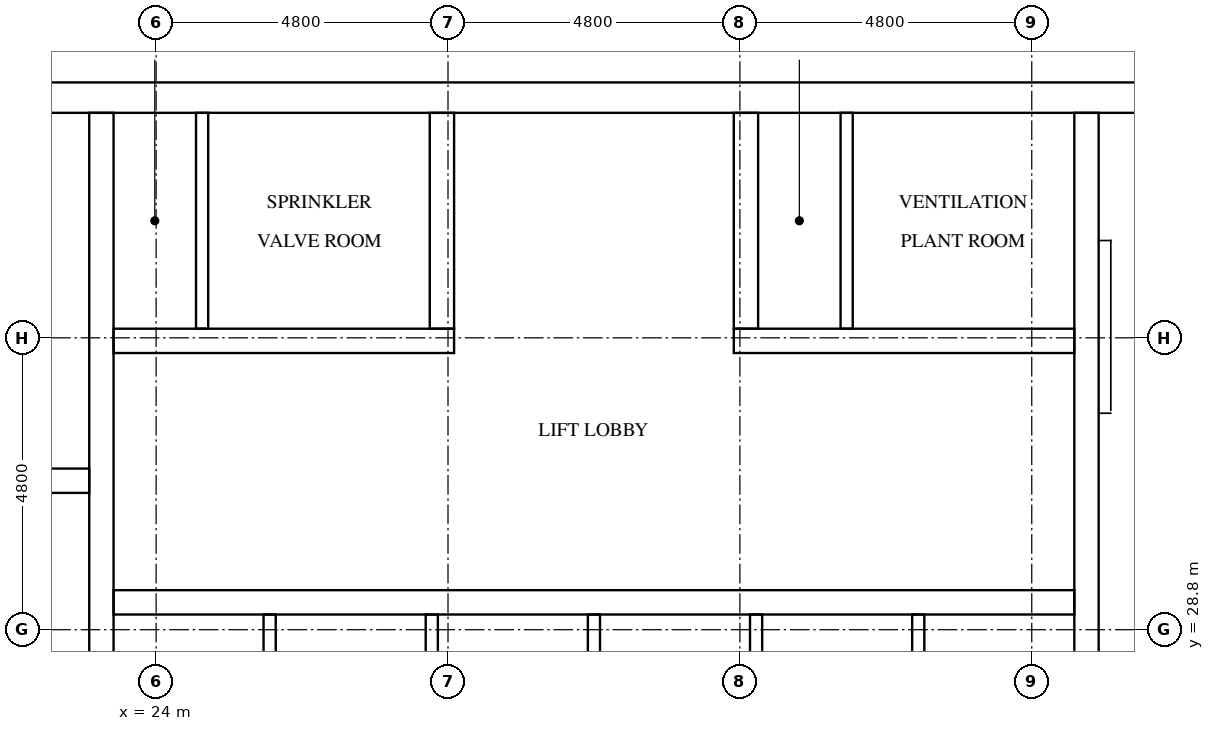
"""IFC4 building model, lengths in metres.
Left out: names, types, materials, properties, quantities, classifications, styles, units other than length and angle.
Written with IfcOpenShell. Run it as: python <this file> out.ifc"""

import sys

from ifc_helpers import new_model, si_unit, direction, frame, frame_2d, origin, place, context, subcontext, project, spatial, rectangle, extrude, element, fill, save


model = new_model("IFC4")
c1 = context("Model", 3, precision=1e-05, world=origin(), true_north=direction((0.0, 1.0)))
c2 = subcontext(c1, "Body", "Model", "MODEL_VIEW")
j1 = project(units=[si_unit("LENGTHUNIT", "METRE"), si_unit("PLANEANGLEUNIT", "RADIAN")], contexts=[c1])
p1 = place(None, origin())
s1 = spatial("IfcSite", under=j1, at=p1, CompositionType="ELEMENT")
p2 = place(p1, origin())
s2 = spatial("IfcBuilding", under=s1, at=p2, CompositionType="ELEMENT")
p3 = place(p2, frame((0.0, 0.0, 268.6)))
s3 = spatial("IfcBuildingStorey", under=s2, at=p3, CompositionType="ELEMENT", Elevation=268.6)
p4 = place(p3, frame((15.0, 37.55, 0.0), z_axis=(0.0, 0.0, 1.0), x_axis=(1.0, 0.0, 0.0)))
e1 = element("IfcWall", 1, at=p4, inside=s3, PredefinedType="SHEAR", context=c2, shape_type="SweptSolid", body=[
    extrude(rectangle(XDim=32.4, YDim=0.5, at=frame_2d((16.2, 0.0))), origin(), (0.0, 0.0, 1.0), 3.2),
])
p5 = place(p4, frame((15.3, 0.0, 0.0)))
e2 = element("IfcOpeningElement", 2, at=p5, cuts=e1, PredefinedType="OPENING", context=c2, shape_type="SweptSolid", body=[
    extrude(rectangle(XDim=1.8, YDim=2.1, at=frame_2d((0.9, 1.05))), frame((0.0, 0.26, 0.0), z_axis=(0.0, -1.0, 0.0), x_axis=(1.0, 0.0, 0.0)), (0.0, 0.0, 1.0), 0.52),
])
p6 = place(p4, frame((1.282, 0.0, 0.0)))
e3 = element("IfcOpeningElement", 3, at=p6, cuts=e1, PredefinedType="OPENING", context=c2, shape_type="SweptSolid", body=[
    extrude(rectangle(XDim=1.0, YDim=2.1, at=frame_2d((0.5, 1.05))), frame((0.0, 0.26, 0.0), z_axis=(0.0, -1.0, 0.0), x_axis=(1.0, 0.0, 0.0)), (0.0, 0.0, 1.0), 0.52),
])
p7 = place(p4, frame((5.082, 0.0, 0.0)))
e4 = element("IfcOpeningElement", 4, at=p7, cuts=e1, PredefinedType="OPENING", context=c2, shape_type="SweptSolid", body=[
    extrude(rectangle(XDim=1.0, YDim=2.1, at=frame_2d((0.5, 1.05))), frame((0.0, 0.26, 0.0), z_axis=(0.0, -1.0, 0.0), x_axis=(1.0, 0.0, 0.0)), (0.0, 0.0, 1.0), 0.52),
])
p8 = place(p3, frame((23.1, 15.5, 0.0), z_axis=(0.0, 0.0, 1.0), x_axis=(0.0, 1.0, 0.0)))
e5 = element("IfcWall", 5, at=p8, inside=s3, PredefinedType="SHEAR", context=c2, shape_type="SweptSolid", body=[
    extrude(rectangle(XDim=21.8, YDim=0.4, at=frame_2d((10.9, 0.0))), origin(), (0.0, 0.0, 1.0), 3.2),
])
p9 = place(p3, frame((39.3, 27.75, 0.0), z_axis=(0.0, 0.0, 1.0), x_axis=(0.0, 1.0, 0.0)))
e6 = element("IfcWall", 6, at=p9, inside=s3, PredefinedType="SHEAR", context=c2, shape_type="SweptSolid", body=[
    extrude(rectangle(XDim=9.55, YDim=0.4, at=frame_2d((4.775, 0.0))), origin(), (0.0, 0.0, 1.0), 3.2),
])
p10 = place(p3, frame((15.5, 31.25, 0.0), z_axis=(0.0, 0.0, 1.0), x_axis=(1.0, 0.0, 0.0)))
e7 = element("IfcWall", 7, at=p10, inside=s3, PredefinedType="SHEAR", context=c2, shape_type="SweptSolid", body=[
    extrude(rectangle(XDim=7.4, YDim=0.4, at=frame_2d((3.7, 0.0))), origin(), (0.0, 0.0, 1.0), 3.2),
])
p11 = place(p3, frame((23.3, 29.25, 0.0), z_axis=(0.0, 0.0, 1.0), x_axis=(1.0, 0.0, 0.0)))
e8 = element("IfcWall", 8, at=p11, inside=s3, PredefinedType="SHEAR", context=c2, shape_type="SweptSolid", body=[
    extrude(rectangle(XDim=15.8, YDim=0.4, at=frame_2d((7.9, 0.0))), origin(), (0.0, 0.0, 1.0), 3.2),
])
p12 = place(p11, frame((0.683, 0.0, 0.0)))
e9 = element("IfcOpeningElement", 9, at=p12, cuts=e8, PredefinedType="OPENING", context=c2, shape_type="SweptSolid", body=[
    extrude(rectangle(XDim=1.1, YDim=2.1, at=frame_2d((0.55, 1.05))), frame((0.0, 0.21, 0.0), z_axis=(0.0, -1.0, 0.0), x_axis=(1.0, 0.0, 0.0)), (0.0, 0.0, 1.0), 0.42),
])
p13 = place(p11, frame((3.35, 0.0, 0.0)))
e10 = element("IfcOpeningElement", 10, at=p13, cuts=e8, PredefinedType="OPENING", context=c2, shape_type="SweptSolid", body=[
    extrude(rectangle(XDim=1.1, YDim=2.1, at=frame_2d((0.55, 1.05))), frame((0.0, 0.21, 0.0), z_axis=(0.0, -1.0, 0.0), x_axis=(1.0, 0.0, 0.0)), (0.0, 0.0, 1.0), 0.42),
])
p14 = place(p11, frame((6.017, 0.0, 0.0)))
e11 = element("IfcOpeningElement", 11, at=p14, cuts=e8, PredefinedType="OPENING", context=c2, shape_type="SweptSolid", body=[
    extrude(rectangle(XDim=1.1, YDim=2.1, at=frame_2d((0.55, 1.05))), frame((0.0, 0.21, 0.0), z_axis=(0.0, -1.0, 0.0), x_axis=(1.0, 0.0, 0.0)), (0.0, 0.0, 1.0), 0.42),
])
p15 = place(p11, frame((8.683, 0.0, 0.0)))
e12 = element("IfcOpeningElement", 12, at=p15, cuts=e8, PredefinedType="OPENING", context=c2, shape_type="SweptSolid", body=[
    extrude(rectangle(XDim=1.1, YDim=2.1, at=frame_2d((0.55, 1.05))), frame((0.0, 0.21, 0.0), z_axis=(0.0, -1.0, 0.0), x_axis=(1.0, 0.0, 0.0)), (0.0, 0.0, 1.0), 0.42),
])
p16 = place(p11, frame((11.35, 0.0, 0.0)))
e13 = element("IfcOpeningElement", 13, at=p16, cuts=e8, PredefinedType="OPENING", context=c2, shape_type="SweptSolid", body=[
    extrude(rectangle(XDim=1.1, YDim=2.1, at=frame_2d((0.55, 1.05))), frame((0.0, 0.21, 0.0), z_axis=(0.0, -1.0, 0.0), x_axis=(1.0, 0.0, 0.0)), (0.0, 0.0, 1.0), 0.42),
])
p17 = place(p11, frame((14.017, 0.0, 0.0)))
e14 = element("IfcOpeningElement", 14, at=p17, cuts=e8, PredefinedType="OPENING", context=c2, shape_type="SweptSolid", body=[
    extrude(rectangle(XDim=1.1, YDim=2.1, at=frame_2d((0.55, 1.05))), frame((0.0, 0.21, 0.0), z_axis=(0.0, -1.0, 0.0), x_axis=(1.0, 0.0, 0.0)), (0.0, 0.0, 1.0), 0.42),
])
p18 = place(p3, frame((23.3, 33.55, 0.0), z_axis=(0.0, 0.0, 1.0), x_axis=(1.0, 0.0, 0.0)))
e15 = element("IfcWall", 15, at=p18, inside=s3, PredefinedType="SHEAR", context=c2, shape_type="SweptSolid", body=[
    extrude(rectangle(XDim=5.6, YDim=0.4, at=frame_2d((2.8, 0.0))), origin(), (0.0, 0.0, 1.0), 3.2),
])
p19 = place(p18, frame((0.178, 0.0, 0.0)))
e16 = element("IfcOpeningElement", 16, at=p19, cuts=e15, PredefinedType="OPENING", context=c2, shape_type="SweptSolid", body=[
    extrude(rectangle(XDim=1.0, YDim=2.1, at=frame_2d((0.5, 1.05))), frame((0.0, 0.21, 0.0), z_axis=(0.0, -1.0, 0.0), x_axis=(1.0, 0.0, 0.0)), (0.0, 0.0, 1.0), 0.42),
])
p20 = place(p18, frame((2.878, 0.0, 0.0)))
e17 = element("IfcOpeningElement", 17, at=p20, cuts=e15, PredefinedType="OPENING", context=c2, shape_type="SweptSolid", body=[
    extrude(rectangle(XDim=1.0, YDim=2.1, at=frame_2d((0.5, 1.05))), frame((0.0, 0.21, 0.0), z_axis=(0.0, -1.0, 0.0), x_axis=(1.0, 0.0, 0.0)), (0.0, 0.0, 1.0), 0.42),
])
p21 = place(p3, frame((33.5, 33.55, 0.0), z_axis=(0.0, 0.0, 1.0), x_axis=(1.0, 0.0, 0.0)))
e18 = element("IfcWall", 18, at=p21, inside=s3, PredefinedType="SHEAR", context=c2, shape_type="SweptSolid", body=[
    extrude(rectangle(XDim=5.6, YDim=0.4, at=frame_2d((2.8, 0.0))), origin(), (0.0, 0.0, 1.0), 3.2),
])
p22 = place(p21, frame((0.578, 0.0, 0.0)))
e19 = element("IfcOpeningElement", 19, at=p22, cuts=e18, PredefinedType="OPENING", context=c2, shape_type="SweptSolid", body=[
    extrude(rectangle(XDim=1.0, YDim=2.1, at=frame_2d((0.5, 1.05))), frame((0.0, 0.21, 0.0), z_axis=(0.0, -1.0, 0.0), x_axis=(1.0, 0.0, 0.0)), (0.0, 0.0, 1.0), 0.42),
])
p23 = place(p21, frame((3.278, 0.0, 0.0)))
e20 = element("IfcOpeningElement", 20, at=p23, cuts=e18, PredefinedType="OPENING", context=c2, shape_type="SweptSolid", body=[
    extrude(rectangle(XDim=1.0, YDim=2.1, at=frame_2d((0.5, 1.05))), frame((0.0, 0.21, 0.0), z_axis=(0.0, -1.0, 0.0), x_axis=(1.0, 0.0, 0.0)), (0.0, 0.0, 1.0), 0.42),
])
for number, where, z_axis, x_axis in (
    (21, (28.7, 33.75, 0.0), (0.0, 0.0, 1.0), (0.0, 1.0, 0.0)),
    (22, (33.7, 33.75, 0.0), (0.0, 0.0, 1.0), (0.0, 1.0, 0.0)),
):
    element("IfcWall", number, at=place(p3, frame(where, z_axis=z_axis, x_axis=x_axis)), inside=s3, PredefinedType="SHEAR", context=c2, shape_type="SweptSolid", body=[
        extrude(rectangle(XDim=3.55, YDim=0.4, at=frame_2d((1.775, 0.0))), origin(), (0.0, 0.0, 1.0), 3.2),
    ])
for number, where, z_axis, x_axis in (
    (23, (25.867, 26.35, 0.0), (0.0, 0.0, 1.0), (0.0, 1.0, 0.0)),
    (24, (28.533, 26.35, 0.0), (0.0, 0.0, 1.0), (0.0, 1.0, 0.0)),
    (25, (31.2, 26.35, 0.0), (0.0, 0.0, 1.0), (0.0, 1.0, 0.0)),
    (26, (33.867, 26.35, 0.0), (0.0, 0.0, 1.0), (0.0, 1.0, 0.0)),
    (27, (36.533, 26.35, 0.0), (0.0, 0.0, 1.0), (0.0, 1.0, 0.0)),
):
    element("IfcWall", number, at=place(p3, frame(where, z_axis=z_axis, x_axis=x_axis)), inside=s3, PredefinedType="SOLIDWALL", context=c2, shape_type="SweptSolid", body=[
        extrude(rectangle(XDim=2.7, YDim=0.2, at=frame_2d((1.35, 0.0))), origin(), (0.0, 0.0, 1.0), 3.2),
    ])
for number, where, z_axis, x_axis in (
    (28, (24.756, 33.75, 0.0), (0.0, 0.0, 1.0), (0.0, 1.0, 0.0)),
    (29, (35.356, 33.75, 0.0), (0.0, 0.0, 1.0), (0.0, 1.0, 0.0)),
):
    element("IfcWall", number, at=place(p3, frame(where, z_axis=z_axis, x_axis=x_axis)), inside=s3, PredefinedType="PARTITIONING", context=c2, shape_type="SweptSolid", body=[
        extrude(rectangle(XDim=3.55, YDim=0.2, at=frame_2d((1.775, 0.0))), origin(), (0.0, 0.0, 1.0), 3.2),
    ])
p24 = place(p12, origin())
e30 = element("IfcDoor", 30, at=p24, inside=s3, OperationType="DOUBLE_DOOR_SLIDING", PredefinedType="DOOR", context=c2, shape_type="SweptSolid", body=[
    extrude(rectangle(XDim=1.1, YDim=2.1, at=frame_2d((0.55, 1.05))), frame((0.0, 0.025, 0.0), z_axis=(0.0, -1.0, 0.0), x_axis=(1.0, 0.0, 0.0)), (0.0, 0.0, 1.0), 0.05),
])
fill(e9, e30)
p25 = place(p13, origin())
e31 = element("IfcDoor", 31, at=p25, inside=s3, OperationType="DOUBLE_DOOR_SLIDING", PredefinedType="DOOR", context=c2, shape_type="SweptSolid", body=[
    extrude(rectangle(XDim=1.1, YDim=2.1, at=frame_2d((0.55, 1.05))), frame((0.0, 0.025, 0.0), z_axis=(0.0, -1.0, 0.0), x_axis=(1.0, 0.0, 0.0)), (0.0, 0.0, 1.0), 0.05),
])
fill(e10, e31)
p26 = place(p14, origin())
e32 = element("IfcDoor", 32, at=p26, inside=s3, OperationType="DOUBLE_DOOR_SLIDING", PredefinedType="DOOR", context=c2, shape_type="SweptSolid", body=[
    extrude(rectangle(XDim=1.1, YDim=2.1, at=frame_2d((0.55, 1.05))), frame((0.0, 0.025, 0.0), z_axis=(0.0, -1.0, 0.0), x_axis=(1.0, 0.0, 0.0)), (0.0, 0.0, 1.0), 0.05),
])
fill(e11, e32)
p27 = place(p15, origin())
e33 = element("IfcDoor", 33, at=p27, inside=s3, OperationType="DOUBLE_DOOR_SLIDING", PredefinedType="DOOR", context=c2, shape_type="SweptSolid", body=[
    extrude(rectangle(XDim=1.1, YDim=2.1, at=frame_2d((0.55, 1.05))), frame((0.0, 0.025, 0.0), z_axis=(0.0, -1.0, 0.0), x_axis=(1.0, 0.0, 0.0)), (0.0, 0.0, 1.0), 0.05),
])
fill(e12, e33)
p28 = place(p16, origin())
e34 = element("IfcDoor", 34, at=p28, inside=s3, OperationType="DOUBLE_DOOR_SLIDING", PredefinedType="DOOR", context=c2, shape_type="SweptSolid", body=[
    extrude(rectangle(XDim=1.1, YDim=2.1, at=frame_2d((0.55, 1.05))), frame((0.0, 0.025, 0.0), z_axis=(0.0, -1.0, 0.0), x_axis=(1.0, 0.0, 0.0)), (0.0, 0.0, 1.0), 0.05),
])
fill(e13, e34)
p29 = place(p17, origin())
e35 = element("IfcDoor", 35, at=p29, inside=s3, OperationType="DOUBLE_DOOR_SLIDING", PredefinedType="DOOR", context=c2, shape_type="SweptSolid", body=[
    extrude(rectangle(XDim=1.1, YDim=2.1, at=frame_2d((0.55, 1.05))), frame((0.0, 0.025, 0.0), z_axis=(0.0, -1.0, 0.0), x_axis=(1.0, 0.0, 0.0)), (0.0, 0.0, 1.0), 0.05),
])
fill(e14, e35)
p30 = place(p5, origin())
e36 = element("IfcDoor", 36, at=p30, inside=s3, OperationType="DOUBLE_DOOR_SINGLE_SWING", PredefinedType="DOOR", context=c2, shape_type="SweptSolid", body=[
    extrude(rectangle(XDim=1.8, YDim=2.1, at=frame_2d((0.9, 1.05))), frame((0.0, 0.025, 0.0), z_axis=(0.0, -1.0, 0.0), x_axis=(1.0, 0.0, 0.0)), (0.0, 0.0, 1.0), 0.05),
])
fill(e2, e36)
p31 = place(p19, frame((1.0, 0.0, 0.0), z_axis=(0.0, 0.0, 1.0), x_axis=(-1.0, 0.0, 0.0)))
e37 = element("IfcDoor", 37, at=p31, inside=s3, OperationType="SINGLE_SWING_LEFT", PredefinedType="DOOR", context=c2, shape_type="SweptSolid", body=[
    extrude(rectangle(XDim=1.0, YDim=2.1, at=frame_2d((0.5, 1.05))), frame((0.0, 0.025, 0.0), z_axis=(0.0, -1.0, 0.0), x_axis=(1.0, 0.0, 0.0)), (0.0, 0.0, 1.0), 0.05),
])
fill(e16, e37)
p32 = place(p20, frame((1.0, 0.0, 0.0), z_axis=(0.0, 0.0, 1.0), x_axis=(-1.0, 0.0, 0.0)))
e38 = element("IfcDoor", 38, at=p32, inside=s3, OperationType="SINGLE_SWING_RIGHT", PredefinedType="DOOR", context=c2, shape_type="SweptSolid", body=[
    extrude(rectangle(XDim=1.0, YDim=2.1, at=frame_2d((0.5, 1.05))), frame((0.0, 0.025, 0.0), z_axis=(0.0, -1.0, 0.0), x_axis=(1.0, 0.0, 0.0)), (0.0, 0.0, 1.0), 0.05),
])
fill(e17, e38)
p33 = place(p22, frame((1.0, 0.0, 0.0), z_axis=(0.0, 0.0, 1.0), x_axis=(-1.0, 0.0, 0.0)))
e39 = element("IfcDoor", 39, at=p33, inside=s3, OperationType="SINGLE_SWING_LEFT", PredefinedType="DOOR", context=c2, shape_type="SweptSolid", body=[
    extrude(rectangle(XDim=1.0, YDim=2.1, at=frame_2d((0.5, 1.05))), frame((0.0, 0.025, 0.0), z_axis=(0.0, -1.0, 0.0), x_axis=(1.0, 0.0, 0.0)), (0.0, 0.0, 1.0), 0.05),
])
fill(e19, e39)
p34 = place(p23, frame((1.0, 0.0, 0.0), z_axis=(0.0, 0.0, 1.0), x_axis=(-1.0, 0.0, 0.0)))
e40 = element("IfcDoor", 40, at=p34, inside=s3, OperationType="SINGLE_SWING_RIGHT", PredefinedType="DOOR", context=c2, shape_type="SweptSolid", body=[
    extrude(rectangle(XDim=1.0, YDim=2.1, at=frame_2d((0.5, 1.05))), frame((0.0, 0.025, 0.0), z_axis=(0.0, -1.0, 0.0), x_axis=(1.0, 0.0, 0.0)), (0.0, 0.0, 1.0), 0.05),
])
fill(e20, e40)
save(model, sys.argv[1])
